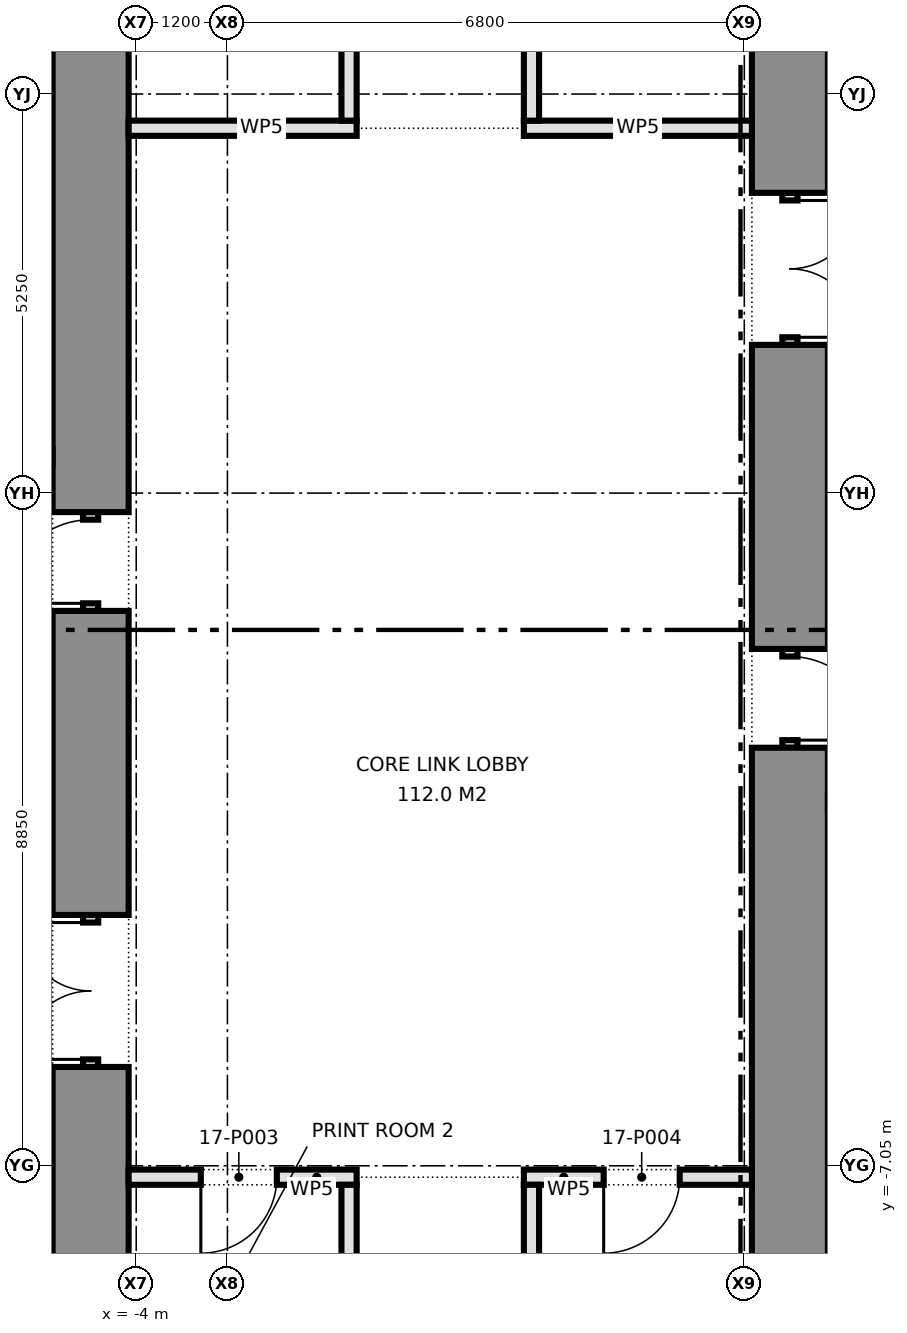
"""IFC4 building model, lengths in metres.
Left out: names, types, materials, properties, quantities, classifications, styles, units other than length and angle.
Written with IfcOpenShell. Run it as: python <this file> out.ifc"""

import sys

from ifc_helpers import new_model, si_unit, direction, frame, frame_2d, origin, place, context, subcontext, project, spatial, rectangle, extrude, element, fill, save


model = new_model("IFC4")
c1 = context("Model", 3, precision=1e-05, world=origin(), true_north=direction((0.0, 1.0)))
c2 = subcontext(c1, "Body", "Model", "MODEL_VIEW")
j1 = project(units=[si_unit("LENGTHUNIT", "METRE"), si_unit("PLANEANGLEUNIT", "RADIAN")], contexts=[c1])
p1 = place(None, origin())
s1 = spatial("IfcSite", under=j1, at=p1, CompositionType="ELEMENT")
p2 = place(p1, origin())
s2 = spatial("IfcBuilding", under=s1, at=p2, CompositionType="ELEMENT")
p3 = place(p2, frame((0.0, 0.0, 77.6)))
s3 = spatial("IfcBuildingStorey", under=s2, at=p3, CompositionType="ELEMENT", Elevation=77.6)
p4 = place(p3, frame((-4.6, -8.9, 0.0), z_axis=(0.0, 0.0, 1.0), x_axis=(0.0, 1.0, 0.0)))
e1 = element("IfcWall", 1, at=p4, inside=s3, PredefinedType="SHEAR", context=c2, shape_type="SweptSolid", body=[
    extrude(rectangle(XDim=3.15, YDim=1.0, at=frame_2d((1.575, 0.0))), origin(), (0.0, 0.0, 1.0), 4.2),
])
p5 = place(p3, frame((-4.6, -5.75, 0.0), z_axis=(0.0, 0.0, 1.0), x_axis=(0.0, 1.0, 0.0)))
e2 = element("IfcWall", 2, at=p5, inside=s3, PredefinedType="PARTITIONING", context=c2, shape_type="SweptSolid", body=[
    extrude(rectangle(XDim=2.0, YDim=0.2, at=frame_2d((1.0, 0.0))), origin(), (0.0, 0.0, 1.0), 2.4),
])
p6 = place(p5, frame((0.1, 0.0, 0.0)))
e3 = element("IfcOpeningElement", 3, at=p6, cuts=e2, PredefinedType="OPENING", context=c2, shape_type="SweptSolid", body=[
    extrude(rectangle(XDim=1.8, YDim=2.1, at=frame_2d((0.9, 1.05))), frame((0.0, 0.11, 0.0), z_axis=(0.0, -1.0, 0.0), x_axis=(1.0, 0.0, 0.0)), (0.0, 0.0, 1.0), 0.22),
])
p7 = place(p3, frame((-4.6, -3.75, 0.0), z_axis=(0.0, 0.0, 1.0), x_axis=(0.0, 1.0, 0.0)))
e4 = element("IfcWall", 4, at=p7, inside=s3, PredefinedType="SHEAR", context=c2, shape_type="SweptSolid", body=[
    extrude(rectangle(XDim=4.0, YDim=1.0, at=frame_2d((2.0, 0.0))), origin(), (0.0, 0.0, 1.0), 4.2),
])
p8 = place(p3, frame((-4.6, 0.25, 0.0), z_axis=(0.0, 0.0, 1.0), x_axis=(0.0, 1.0, 0.0)))
e5 = element("IfcWall", 5, at=p8, inside=s3, PredefinedType="PARTITIONING", context=c2, shape_type="SweptSolid", body=[
    extrude(rectangle(XDim=1.3, YDim=0.2, at=frame_2d((0.65, 0.0))), origin(), (0.0, 0.0, 1.0), 2.4),
])
p9 = place(p8, frame((0.1, 0.0, 0.0)))
e6 = element("IfcOpeningElement", 6, at=p9, cuts=e5, PredefinedType="OPENING", context=c2, shape_type="SweptSolid", body=[
    extrude(rectangle(XDim=1.1, YDim=2.1, at=frame_2d((0.55, 1.05))), frame((0.0, 0.11, 0.0), z_axis=(0.0, -1.0, 0.0), x_axis=(1.0, 0.0, 0.0)), (0.0, 0.0, 1.0), 0.22),
])
p10 = place(p3, frame((-4.6, 1.55, 0.0), z_axis=(0.0, 0.0, 1.0), x_axis=(0.0, 1.0, 0.0)))
e7 = element("IfcWall", 7, at=p10, inside=s3, PredefinedType="SHEAR", context=c2, shape_type="SweptSolid", body=[
    extrude(rectangle(XDim=7.35, YDim=1.0, at=frame_2d((3.675, 0.0))), origin(), (0.0, 0.0, 1.0), 4.2),
])
p11 = place(p3, frame((4.6, 8.9, 0.0), z_axis=(0.0, 0.0, 1.0), x_axis=(0.0, -1.0, 0.0)))
e8 = element("IfcWall", 8, at=p11, inside=s3, PredefinedType="SHEAR", context=c2, shape_type="SweptSolid", body=[
    extrude(rectangle(XDim=3.15, YDim=1.0, at=frame_2d((1.575, 0.0))), origin(), (0.0, 0.0, 1.0), 4.2),
])
p12 = place(p3, frame((4.6, 5.75, 0.0), z_axis=(0.0, 0.0, 1.0), x_axis=(0.0, -1.0, 0.0)))
e9 = element("IfcWall", 9, at=p12, inside=s3, PredefinedType="PARTITIONING", context=c2, shape_type="SweptSolid", body=[
    extrude(rectangle(XDim=2.0, YDim=0.2, at=frame_2d((1.0, 0.0))), origin(), (0.0, 0.0, 1.0), 2.4),
])
p13 = place(p12, frame((0.1, 0.0, 0.0)))
e10 = element("IfcOpeningElement", 10, at=p13, cuts=e9, PredefinedType="OPENING", context=c2, shape_type="SweptSolid", body=[
    extrude(rectangle(XDim=1.8, YDim=2.1, at=frame_2d((0.9, 1.05))), frame((0.0, 0.11, 0.0), z_axis=(0.0, -1.0, 0.0), x_axis=(1.0, 0.0, 0.0)), (0.0, 0.0, 1.0), 0.22),
])
p14 = place(p3, frame((4.6, 3.75, 0.0), z_axis=(0.0, 0.0, 1.0), x_axis=(0.0, -1.0, 0.0)))
e11 = element("IfcWall", 11, at=p14, inside=s3, PredefinedType="SHEAR", context=c2, shape_type="SweptSolid", body=[
    extrude(rectangle(XDim=4.0, YDim=1.0, at=frame_2d((2.0, 0.0))), origin(), (0.0, 0.0, 1.0), 4.2),
])
p15 = place(p3, frame((4.6, -0.25, 0.0), z_axis=(0.0, 0.0, 1.0), x_axis=(0.0, -1.0, 0.0)))
e12 = element("IfcWall", 12, at=p15, inside=s3, PredefinedType="PARTITIONING", context=c2, shape_type="SweptSolid", body=[
    extrude(rectangle(XDim=1.3, YDim=0.2, at=frame_2d((0.65, 0.0))), origin(), (0.0, 0.0, 1.0), 2.4),
])
p16 = place(p15, frame((0.1, 0.0, 0.0)))
e13 = element("IfcOpeningElement", 13, at=p16, cuts=e12, PredefinedType="OPENING", context=c2, shape_type="SweptSolid", body=[
    extrude(rectangle(XDim=1.1, YDim=2.1, at=frame_2d((0.55, 1.05))), frame((0.0, 0.11, 0.0), z_axis=(0.0, -1.0, 0.0), x_axis=(1.0, 0.0, 0.0)), (0.0, 0.0, 1.0), 0.22),
])
p17 = place(p3, frame((4.6, -1.55, 0.0), z_axis=(0.0, 0.0, 1.0), x_axis=(0.0, -1.0, 0.0)))
e14 = element("IfcWall", 14, at=p17, inside=s3, PredefinedType="SHEAR", context=c2, shape_type="SweptSolid", body=[
    extrude(rectangle(XDim=7.35, YDim=1.0, at=frame_2d((3.675, 0.0))), origin(), (0.0, 0.0, 1.0), 4.2),
])
p18 = place(p3, frame((-4.1, -7.2, 0.0), z_axis=(0.0, 0.0, 1.0), x_axis=(1.0, 0.0, 0.0)))
e15 = element("IfcWall", 15, at=p18, inside=s3, PredefinedType="PARTITIONING", context=c2, shape_type="SweptSolid", body=[
    extrude(rectangle(XDim=3.0, YDim=0.2, at=frame_2d((1.5, 0.0))), origin(), (0.0, 0.0, 1.0), 4.2),
])
p19 = place(p18, frame((0.95, 0.0, 0.0)))
e16 = element("IfcOpeningElement", 16, at=p19, cuts=e15, PredefinedType="OPENING", context=c2, shape_type="SweptSolid", body=[
    extrude(rectangle(XDim=1.0, YDim=2.1, at=frame_2d((0.5, 1.05))), frame((0.0, 0.11, 0.0), z_axis=(0.0, -1.0, 0.0), x_axis=(1.0, 0.0, 0.0)), (0.0, 0.0, 1.0), 0.22),
])
p20 = place(p3, frame((1.1, -7.2, 0.0), z_axis=(0.0, 0.0, 1.0), x_axis=(1.0, 0.0, 0.0)))
e17 = element("IfcWall", 17, at=p20, inside=s3, PredefinedType="PARTITIONING", context=c2, shape_type="SweptSolid", body=[
    extrude(rectangle(XDim=3.0, YDim=0.2, at=frame_2d((1.5, 0.0))), origin(), (0.0, 0.0, 1.0), 4.2),
])
p21 = place(p20, frame((1.05, 0.0, 0.0)))
e18 = element("IfcOpeningElement", 18, at=p21, cuts=e17, PredefinedType="OPENING", context=c2, shape_type="SweptSolid", body=[
    extrude(rectangle(XDim=1.0, YDim=2.1, at=frame_2d((0.5, 1.05))), frame((0.0, 0.11, 0.0), z_axis=(0.0, -1.0, 0.0), x_axis=(1.0, 0.0, 0.0)), (0.0, 0.0, 1.0), 0.22),
])
for number, where, z_axis, x_axis in (
    (19, (-4.1, 6.6, 0.0), (0.0, 0.0, 1.0), (1.0, 0.0, 0.0)),
    (20, (1.1, 6.6, 0.0), (0.0, 0.0, 1.0), (1.0, 0.0, 0.0)),
):
    element("IfcWall", number, at=place(p3, frame(where, z_axis=z_axis, x_axis=x_axis)), inside=s3, PredefinedType="PARTITIONING", context=c2, shape_type="SweptSolid", body=[
        extrude(rectangle(XDim=3.0, YDim=0.2, at=frame_2d((1.5, 0.0))), origin(), (0.0, 0.0, 1.0), 4.2),
    ])
p22 = place(p3, frame((1.2, -9.8, 0.0), z_axis=(0.0, 0.0, 1.0), x_axis=(0.0, 1.0, 0.0)))
e21 = element("IfcWall", 21, at=p22, inside=s3, PredefinedType="PARTITIONING", context=c2, shape_type="SweptSolid", body=[
    extrude(rectangle(XDim=2.5, YDim=0.2, at=frame_2d((1.25, 0.0))), origin(), (0.0, 0.0, 1.0), 4.2),
])
p23 = place(p3, frame((1.2, 6.7, 0.0), z_axis=(0.0, 0.0, 1.0), x_axis=(0.0, 1.0, 0.0)))
e22 = element("IfcWall", 22, at=p23, inside=s3, PredefinedType="PARTITIONING", context=c2, shape_type="SweptSolid", body=[
    extrude(rectangle(XDim=3.1, YDim=0.2, at=frame_2d((1.55, 0.0))), origin(), (0.0, 0.0, 1.0), 4.2),
])
p24 = place(p23, frame((1.05, 0.0, 0.0)))
e23 = element("IfcOpeningElement", 23, at=p24, cuts=e22, PredefinedType="OPENING", context=c2, shape_type="SweptSolid", body=[
    extrude(rectangle(XDim=1.0, YDim=2.1, at=frame_2d((0.5, 1.05))), frame((0.0, 0.11, 0.0), z_axis=(0.0, -1.0, 0.0), x_axis=(1.0, 0.0, 0.0)), (0.0, 0.0, 1.0), 0.22),
])
p25 = place(p3, frame((-1.2, -9.8, 0.0), z_axis=(0.0, 0.0, 1.0), x_axis=(0.0, 1.0, 0.0)))
e24 = element("IfcWall", 24, at=p25, inside=s3, PredefinedType="PARTITIONING", context=c2, shape_type="SweptSolid", body=[
    extrude(rectangle(XDim=2.5, YDim=0.2, at=frame_2d((1.25, 0.0))), origin(), (0.0, 0.0, 1.0), 4.2),
])
p26 = place(p3, frame((-1.2, 6.7, 0.0), z_axis=(0.0, 0.0, 1.0), x_axis=(0.0, 1.0, 0.0)))
e25 = element("IfcWall", 25, at=p26, inside=s3, PredefinedType="PARTITIONING", context=c2, shape_type="SweptSolid", body=[
    extrude(rectangle(XDim=3.1, YDim=0.2, at=frame_2d((1.55, 0.0))), origin(), (0.0, 0.0, 1.0), 4.2),
])
p27 = place(p26, frame((1.05, 0.0, 0.0)))
e26 = element("IfcOpeningElement", 26, at=p27, cuts=e25, PredefinedType="OPENING", context=c2, shape_type="SweptSolid", body=[
    extrude(rectangle(XDim=1.0, YDim=2.1, at=frame_2d((0.5, 1.05))), frame((0.0, 0.11, 0.0), z_axis=(0.0, -1.0, 0.0), x_axis=(1.0, 0.0, 0.0)), (0.0, 0.0, 1.0), 0.22),
])
p28 = place(p6, origin())
e27 = element("IfcDoor", 27, at=p28, inside=s3, OperationType="DOUBLE_DOOR_SINGLE_SWING", PredefinedType="DOOR", context=c2, shape_type="SweptSolid", body=[
    extrude(rectangle(XDim=1.8, YDim=2.1, at=frame_2d((0.9, 1.05))), frame((0.0, 0.025, 0.0), z_axis=(0.0, -1.0, 0.0), x_axis=(1.0, 0.0, 0.0)), (0.0, 0.0, 1.0), 0.05),
])
fill(e3, e27)
p29 = place(p9, origin())
e28 = element("IfcDoor", 28, at=p29, inside=s3, OperationType="SINGLE_SWING_LEFT", PredefinedType="DOOR", context=c2, shape_type="SweptSolid", body=[
    extrude(rectangle(XDim=1.1, YDim=2.1, at=frame_2d((0.55, 1.05))), frame((0.0, 0.025, 0.0), z_axis=(0.0, -1.0, 0.0), x_axis=(1.0, 0.0, 0.0)), (0.0, 0.0, 1.0), 0.05),
])
fill(e6, e28)
p30 = place(p13, origin())
e29 = element("IfcDoor", 29, at=p30, inside=s3, OperationType="DOUBLE_DOOR_SINGLE_SWING", PredefinedType="DOOR", context=c2, shape_type="SweptSolid", body=[
    extrude(rectangle(XDim=1.8, YDim=2.1, at=frame_2d((0.9, 1.05))), frame((0.0, 0.025, 0.0), z_axis=(0.0, -1.0, 0.0), x_axis=(1.0, 0.0, 0.0)), (0.0, 0.0, 1.0), 0.05),
])
fill(e10, e29)
p31 = place(p16, origin())
e30 = element("IfcDoor", 30, at=p31, inside=s3, OperationType="SINGLE_SWING_RIGHT", PredefinedType="DOOR", context=c2, shape_type="SweptSolid", body=[
    extrude(rectangle(XDim=1.1, YDim=2.1, at=frame_2d((0.55, 1.05))), frame((0.0, 0.025, 0.0), z_axis=(0.0, -1.0, 0.0), x_axis=(1.0, 0.0, 0.0)), (0.0, 0.0, 1.0), 0.05),
])
fill(e13, e30)
p32 = place(p19, frame((1.0, 0.0, 0.0), z_axis=(0.0, 0.0, 1.0), x_axis=(-1.0, 0.0, 0.0)))
e31 = element("IfcDoor", 31, at=p32, inside=s3, OperationType="SINGLE_SWING_RIGHT", PredefinedType="DOOR", context=c2, shape_type="SweptSolid", body=[
    extrude(rectangle(XDim=1.0, YDim=2.1, at=frame_2d((0.5, 1.05))), frame((0.0, 0.025, 0.0), z_axis=(0.0, -1.0, 0.0), x_axis=(1.0, 0.0, 0.0)), (0.0, 0.0, 1.0), 0.05),
])
fill(e16, e31)
p33 = place(p21, frame((1.0, 0.0, 0.0), z_axis=(0.0, 0.0, 1.0), x_axis=(-1.0, 0.0, 0.0)))
e32 = element("IfcDoor", 32, at=p33, inside=s3, OperationType="SINGLE_SWING_RIGHT", PredefinedType="DOOR", context=c2, shape_type="SweptSolid", body=[
    extrude(rectangle(XDim=1.0, YDim=2.1, at=frame_2d((0.5, 1.05))), frame((0.0, 0.025, 0.0), z_axis=(0.0, -1.0, 0.0), x_axis=(1.0, 0.0, 0.0)), (0.0, 0.0, 1.0), 0.05),
])
fill(e18, e32)
save(model, sys.argv[1])
